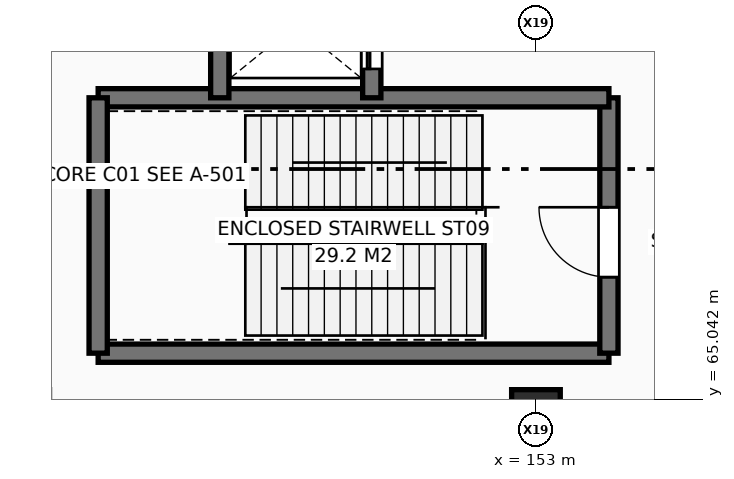
"""IFC4 building model, lengths in metres.
Left out: names, types, materials, properties, quantities, classifications, styles, units other than length and angle.
Written with IfcOpenShell. Run it as: python <this file> out.ifc"""

import sys

from ifc_helpers import new_model, si_unit, direction, frame, frame_2d, origin, origin_2d, place, context, subcontext, project, spatial, rectangle, extrude, element, fill, save


model = new_model("IFC4")
c1 = context("Model", 3, precision=1e-05, world=origin(), true_north=direction((0.0, 1.0)))
c2 = subcontext(c1, "Body", "Model", "MODEL_VIEW")
j1 = project(units=[si_unit("LENGTHUNIT", "METRE"), si_unit("PLANEANGLEUNIT", "RADIAN")], contexts=[c1])
p1 = place(None, origin())
s1 = spatial("IfcSite", under=j1, at=p1, CompositionType="ELEMENT")
p2 = place(p1, origin())
s2 = spatial("IfcBuilding", under=s1, at=p2, CompositionType="ELEMENT")
p3 = place(p2, origin())
s3 = spatial("IfcBuildingStorey", under=s2, at=p3, CompositionType="ELEMENT", Elevation=0.0)
p4 = place(p3, frame((153.0, 64.8, 0.0), z_axis=(0.0, 0.0, 1.0), x_axis=(1.0, 0.0, 0.0)))
e1 = element("IfcColumn", 1, at=p4, inside=s3, PredefinedType="COLUMN", context=c2, shape_type="SweptSolid", body=[
    extrude(rectangle(XDim=0.8, YDim=0.8, at=origin_2d()), origin(), (0.0, 0.0, 1.0), 5.4),
])
p5 = place(p3, frame((145.8, 65.8, 0.0), z_axis=(0.0, 0.0, 1.0), x_axis=(1.0, 0.0, 0.0)))
e2 = element("IfcWall", 2, at=p5, inside=s3, PredefinedType="SHEAR", context=c2, shape_type="SweptSolid", body=[
    extrude(rectangle(XDim=8.4, YDim=0.3, at=frame_2d((4.2, 0.0))), origin(), (0.0, 0.0, 1.0), 5.12),
])
p6 = place(p3, frame((154.2, 65.8, 0.0), z_axis=(0.0, 0.0, 1.0), x_axis=(0.0, 1.0, 0.0)))
e3 = element("IfcWall", 3, at=p6, inside=s3, PredefinedType="SHEAR", context=c2, shape_type="SweptSolid", body=[
    extrude(rectangle(XDim=4.2, YDim=0.3, at=frame_2d((2.1, 0.0))), origin(), (0.0, 0.0, 1.0), 5.12),
])
p7 = place(p6, frame((1.25, 0.0, 0.0)))
e4 = element("IfcOpeningElement", 4, at=p7, cuts=e3, PredefinedType="OPENING", context=c2, shape_type="SweptSolid", body=[
    extrude(rectangle(XDim=1.15, YDim=2.2, at=frame_2d((0.575, 1.1))), frame((0.0, 0.16, 0.0), z_axis=(0.0, -1.0, 0.0), x_axis=(1.0, 0.0, 0.0)), (0.0, 0.0, 1.0), 0.32),
])
p8 = place(p3, frame((154.2, 70.0, 0.0), z_axis=(0.0, 0.0, 1.0), x_axis=(-1.0, 0.0, 0.0)))
e5 = element("IfcWall", 5, at=p8, inside=s3, PredefinedType="SHEAR", context=c2, shape_type="SweptSolid", body=[
    extrude(rectangle(XDim=8.4, YDim=0.3, at=frame_2d((4.2, 0.0))), origin(), (0.0, 0.0, 1.0), 5.12),
])
p9 = place(p3, frame((145.8, 70.0, 0.0), z_axis=(0.0, 0.0, 1.0), x_axis=(0.0, -1.0, 0.0)))
e6 = element("IfcWall", 6, at=p9, inside=s3, PredefinedType="SHEAR", context=c2, shape_type="SweptSolid", body=[
    extrude(rectangle(XDim=4.2, YDim=0.3, at=frame_2d((2.1, 0.0))), origin(), (0.0, 0.0, 1.0), 5.12),
])
p10 = place(p3, frame((147.8, 72.4, 0.0), z_axis=(0.0, 0.0, 1.0), x_axis=(0.0, -1.0, 0.0)))
e7 = element("IfcWall", 7, at=p10, inside=s3, PredefinedType="SHEAR", context=c2, shape_type="SweptSolid", body=[
    extrude(rectangle(XDim=2.4, YDim=0.3, at=frame_2d((1.2, 0.0))), origin(), (0.0, 0.0, 1.0), 5.12),
])
p11 = place(p3, frame((150.3, 70.0, 0.0), z_axis=(0.0, 0.0, 1.0), x_axis=(0.0, 1.0, 0.0)))
e8 = element("IfcWall", 8, at=p11, inside=s3, PredefinedType="SHEAR", context=c2, shape_type="SweptSolid", body=[
    extrude(rectangle(XDim=2.4, YDim=0.3, at=frame_2d((1.2, 0.0))), origin(), (0.0, 0.0, 1.0), 5.12),
])
p12 = place(p11, frame((0.475, 0.0, 0.0)))
e9 = element("IfcOpeningElement", 9, at=p12, cuts=e8, PredefinedType="OPENING", context=c2, shape_type="SweptSolid", body=[
    extrude(rectangle(XDim=1.45, YDim=2.35, at=frame_2d((0.725, 1.175))), frame((0.0, 0.16, 0.0), z_axis=(0.0, -1.0, 0.0), x_axis=(1.0, 0.0, 0.0)), (0.0, 0.0, 1.0), 0.32),
])
p13 = place(p7, frame((1.15, 0.0, 0.0), z_axis=(0.0, 0.0, 1.0), x_axis=(-1.0, 0.0, 0.0)))
e10 = element("IfcDoor", 10, at=p13, inside=s3, OperationType="SINGLE_SWING_RIGHT", PredefinedType="DOOR", context=c2, shape_type="SweptSolid", body=[
    extrude(rectangle(XDim=1.15, YDim=2.2, at=frame_2d((0.575, 1.1))), frame((0.0, 0.025, 0.0), z_axis=(0.0, -1.0, 0.0), x_axis=(1.0, 0.0, 0.0)), (0.0, 0.0, 1.0), 0.05),
])
fill(e4, e10)
p14 = place(p12, origin())
e11 = element("IfcDoor", 11, at=p14, inside=s3, OperationType="SLIDING_TO_LEFT", PredefinedType="DOOR", context=c2, shape_type="SweptSolid", body=[
    extrude(rectangle(XDim=1.45, YDim=2.35, at=frame_2d((0.725, 1.175))), frame((0.0, 0.025, 0.0), z_axis=(0.0, -1.0, 0.0), x_axis=(1.0, 0.0, 0.0)), (0.0, 0.0, 1.0), 0.05),
])
fill(e9, e11)
save(model, sys.argv[1])
